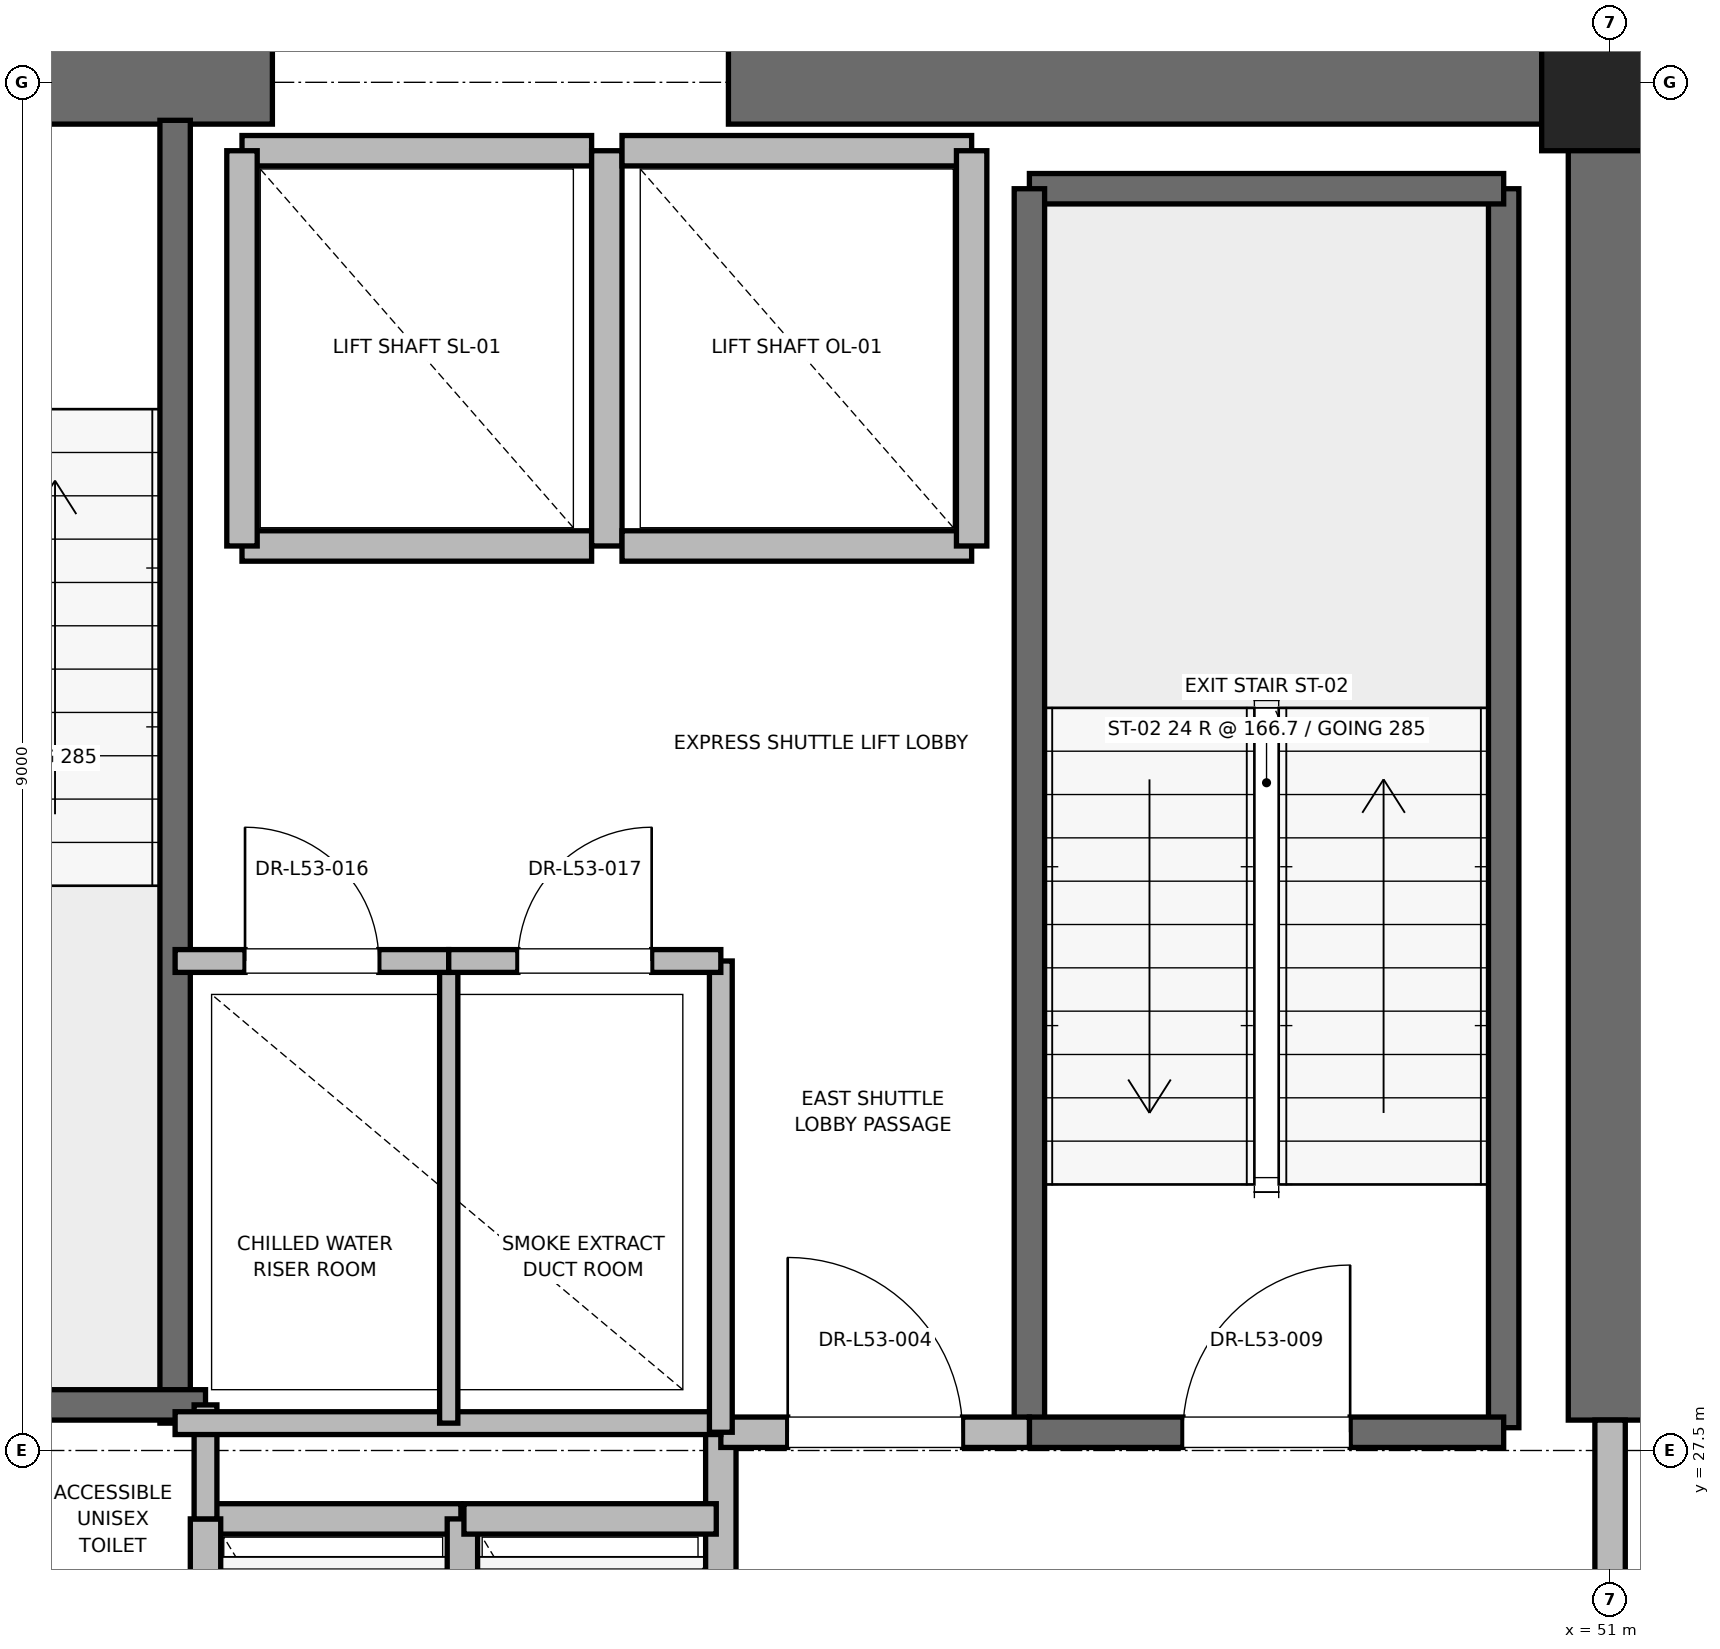
"""IFC4 building model, lengths in metres.
Left out: names, types, materials, properties, quantities, classifications, styles, units other than length and angle.
Written with IfcOpenShell. Run it as: python <this file> out.ifc"""

import sys

from ifc_helpers import new_model, si_unit, direction, frame, frame_2d, origin, origin_2d, place, context, subcontext, project, spatial, rectangle, extrude, element, fill, save


model = new_model("IFC4")
c1 = context("Model", 3, precision=1e-05, world=origin(), true_north=direction((0.0, 1.0)))
c2 = subcontext(c1, "Body", "Model", "MODEL_VIEW")
j1 = project(units=[si_unit("LENGTHUNIT", "METRE"), si_unit("PLANEANGLEUNIT", "RADIAN")], contexts=[c1])
p1 = place(None, origin())
s1 = spatial("IfcSite", under=j1, at=p1, CompositionType="ELEMENT")
p2 = place(p1, origin())
s2 = spatial("IfcBuilding", under=s1, at=p2, CompositionType="ELEMENT")
p3 = place(p2, frame((0.0, 0.0, 229.2)))
s3 = spatial("IfcBuildingStorey", under=s2, at=p3, CompositionType="ELEMENT", Elevation=229.2)
p4 = place(p3, frame((51.0, 36.5, 0.0), z_axis=(0.0, 0.0, 1.0), x_axis=(1.0, 0.0, 0.0)))
e1 = element("IfcColumn", 1, at=p4, inside=s3, PredefinedType="PILASTER", context=c2, shape_type="SweptSolid", body=[
    extrude(rectangle(XDim=0.9, YDim=0.9, at=origin_2d()), origin(), (0.0, 0.0, 1.0), 4.0),
])
p5 = place(p3, frame((37.8, 36.5, 0.0), z_axis=(0.0, 0.0, 1.0), x_axis=(1.0, 0.0, 0.0)))
e2 = element("IfcWall", 2, at=p5, inside=s3, PredefinedType="SHEAR", context=c2, shape_type="SweptSolid", body=[
    extrude(rectangle(XDim=4.4, YDim=0.55, at=frame_2d((2.2, 0.0))), origin(), (0.0, 0.0, 1.0), 3.7),
])
p6 = place(p5, frame((1.65, 0.0, 0.0)))
e3 = element("IfcOpeningElement", 3, at=p6, cuts=e2, PredefinedType="OPENING", context=c2, shape_type="SweptSolid", body=[
    extrude(rectangle(XDim=1.1, YDim=2.15, at=frame_2d((0.55, 1.075))), frame((0.0, 0.275, 0.0), z_axis=(0.0, -1.0, 0.0), x_axis=(1.0, 0.0, 0.0)), (0.0, 0.0, 1.0), 0.55),
])
p7 = place(p3, frame((45.2, 36.5, 0.0), z_axis=(0.0, 0.0, 1.0), x_axis=(1.0, 0.0, 0.0)))
e4 = element("IfcWall", 4, at=p7, inside=s3, PredefinedType="SHEAR", context=c2, shape_type="SweptSolid", body=[
    extrude(rectangle(XDim=5.8, YDim=0.55, at=frame_2d((2.9, 0.0))), origin(), (0.0, 0.0, 1.0), 3.7),
])
p8 = place(p3, frame((51.0, 27.7, 0.0), z_axis=(0.0, 0.0, 1.0), x_axis=(0.0, 1.0, 0.0)))
e5 = element("IfcWall", 5, at=p8, inside=s3, PredefinedType="SHEAR", context=c2, shape_type="SweptSolid", body=[
    extrude(rectangle(XDim=8.8, YDim=0.55, at=frame_2d((4.4, 0.0))), origin(), (0.0, 0.0, 1.0), 3.7),
])
p9 = place(p3, frame((50.3, 27.65, 0.0), z_axis=(0.0, 0.0, 1.0), x_axis=(0.0, 1.0, 0.0)))
e6 = element("IfcWall", 6, at=p9, inside=s3, PredefinedType="SOLIDWALL", context=c2, shape_type="SweptSolid", body=[
    extrude(rectangle(XDim=8.15, YDim=0.2, at=frame_2d((4.075, 0.0))), origin(), (0.0, 0.0, 1.0), 3.7),
])
p10 = place(p3, frame((47.18, 35.8, 0.0), z_axis=(0.0, 0.0, 1.0), x_axis=(1.0, 0.0, 0.0)))
e7 = element("IfcWall", 7, at=p10, inside=s3, PredefinedType="SOLIDWALL", context=c2, shape_type="SweptSolid", body=[
    extrude(rectangle(XDim=3.12, YDim=0.2, at=frame_2d((1.56, 0.0))), origin(), (0.0, 0.0, 1.0), 3.7),
])
p11 = place(p3, frame((47.18, 27.62, 0.0), z_axis=(0.0, 0.0, 1.0), x_axis=(0.0, 1.0, 0.0)))
e8 = element("IfcWall", 8, at=p11, inside=s3, PredefinedType="SOLIDWALL", context=c2, shape_type="SweptSolid", body=[
    extrude(rectangle(XDim=8.18, YDim=0.2, at=frame_2d((4.09, 0.0))), origin(), (0.0, 0.0, 1.0), 3.7),
])
p12 = place(p3, frame((47.18, 27.62, 0.0), z_axis=(0.0, 0.0, 1.0), x_axis=(1.0, 0.0, 0.0)))
e9 = element("IfcWall", 9, at=p12, inside=s3, PredefinedType="SOLIDWALL", context=c2, shape_type="SweptSolid", body=[
    extrude(rectangle(XDim=3.12, YDim=0.2, at=frame_2d((1.56, 0.0))), origin(), (0.0, 0.0, 1.0), 3.7),
])
p13 = place(p12, frame((1.01, 0.0, 0.0)))
e10 = element("IfcOpeningElement", 10, at=p13, cuts=e9, PredefinedType="OPENING", context=c2, shape_type="SweptSolid", body=[
    extrude(rectangle(XDim=1.1, YDim=2.15, at=frame_2d((0.55, 1.075))), frame((0.0, 0.1, 0.0), z_axis=(0.0, -1.0, 0.0), x_axis=(1.0, 0.0, 0.0)), (0.0, 0.0, 1.0), 0.2),
])
p14 = place(p3, frame((41.56, 27.68, 0.0), z_axis=(0.0, 0.0, 1.0), x_axis=(0.0, 1.0, 0.0)))
e11 = element("IfcWall", 11, at=p14, inside=s3, PredefinedType="SOLIDWALL", context=c2, shape_type="SweptSolid", body=[
    extrude(rectangle(XDim=8.57, YDim=0.2, at=frame_2d((4.285, 0.0))), origin(), (0.0, 0.0, 1.0), 3.7),
])
p15 = place(p3, frame((38.44, 27.8, 0.0), z_axis=(0.0, 0.0, 1.0), x_axis=(1.0, 0.0, 0.0)))
e12 = element("IfcWall", 12, at=p15, inside=s3, PredefinedType="SOLIDWALL", context=c2, shape_type="SweptSolid", body=[
    extrude(rectangle(XDim=3.32, YDim=0.2, at=frame_2d((1.66, 0.0))), origin(), (0.0, 0.0, 1.0), 3.7),
])
p16 = place(p3, frame((45.15, 24.25, 0.0), z_axis=(0.0, 0.0, 1.0), x_axis=(0.0, 1.0, 0.0)))
e13 = element("IfcWall", 13, at=p16, inside=s3, PredefinedType="PARTITIONING", context=c2, shape_type="SweptSolid", body=[
    extrude(rectangle(XDim=3.37, YDim=0.2, at=frame_2d((1.685, 0.0))), origin(), (0.0, 0.0, 1.0), 3.7),
])
p17 = place(p3, frame((45.15, 27.62, 0.0), z_axis=(0.0, 0.0, 1.0), x_axis=(1.0, 0.0, 0.0)))
e14 = element("IfcWall", 14, at=p17, inside=s3, PredefinedType="PARTITIONING", context=c2, shape_type="SweptSolid", body=[
    extrude(rectangle(XDim=2.03, YDim=0.2, at=frame_2d((1.015, 0.0))), origin(), (0.0, 0.0, 1.0), 3.7),
])
p18 = place(p17, frame((0.44, 0.0, 0.0)))
e15 = element("IfcOpeningElement", 15, at=p18, cuts=e14, PredefinedType="OPENING", context=c2, shape_type="SweptSolid", body=[
    extrude(rectangle(XDim=1.15, YDim=2.2, at=frame_2d((0.575, 1.1))), frame((0.0, 0.1, 0.0), z_axis=(0.0, -1.0, 0.0), x_axis=(1.0, 0.0, 0.0)), (0.0, 0.0, 1.0), 0.2),
])
p19 = place(p3, frame((51.0, 24.3, 0.0), z_axis=(0.0, 0.0, 1.0), x_axis=(0.0, 1.0, 0.0)))
e16 = element("IfcWall", 16, at=p19, inside=s3, PredefinedType="PARTITIONING", context=c2, shape_type="SweptSolid", body=[
    extrude(rectangle(XDim=3.4, YDim=0.2, at=frame_2d((1.7, 0.0))), origin(), (0.0, 0.0, 1.0), 2.68),
])
p20 = place(p19, frame((1.125, 0.0, 0.0)))
e17 = element("IfcOpeningElement", 17, at=p20, cuts=e16, PredefinedType="OPENING", context=c2, shape_type="SweptSolid", body=[
    extrude(rectangle(XDim=1.15, YDim=2.2, at=frame_2d((0.575, 1.1))), frame((0.0, 0.1, 0.0), z_axis=(0.0, -1.0, 0.0), x_axis=(1.0, 0.0, 0.0)), (0.0, 0.0, 1.0), 0.2),
])
p21 = place(p3, frame((43.44, 27.05, 0.0), z_axis=(0.0, 0.0, 1.0), x_axis=(-1.0, 0.0, 0.0)))
e18 = element("IfcWall", 18, at=p21, inside=s3, PredefinedType="SOLIDWALL", context=c2, shape_type="SweptSolid", body=[
    extrude(rectangle(XDim=1.68, YDim=0.2, at=frame_2d((0.84, 0.0))), origin(), (0.0, 0.0, 1.0), 3.7),
])
for number, where, z_axis, x_axis in (
    (19, (41.76, 27.05, 0.0), (0.0, 0.0, 1.0), (0.0, -1.0, 0.0)),
    (20, (43.45, 24.45, 0.0), (0.0, 0.0, 1.0), (0.0, 1.0, 0.0)),
):
    element("IfcWall", number, at=place(p3, frame(where, z_axis=z_axis, x_axis=x_axis)), inside=s3, PredefinedType="SOLIDWALL", context=c2, shape_type="SweptSolid", body=[
        extrude(rectangle(XDim=2.6, YDim=0.2, at=frame_2d((1.3, 0.0))), origin(), (0.0, 0.0, 1.0), 3.7),
    ])
p22 = place(p3, frame((45.12, 27.05, 0.0), z_axis=(0.0, 0.0, 1.0), x_axis=(-1.0, 0.0, 0.0)))
e21 = element("IfcWall", 21, at=p22, inside=s3, PredefinedType="SOLIDWALL", context=c2, shape_type="SweptSolid", body=[
    extrude(rectangle(XDim=1.66, YDim=0.2, at=frame_2d((0.83, 0.0))), origin(), (0.0, 0.0, 1.0), 3.7),
])
p23 = place(p3, frame((42.0, 33.45, 0.0), z_axis=(0.0, 0.0, 1.0), x_axis=(1.0, 0.0, 0.0)))
e22 = element("IfcWall", 22, at=p23, inside=s3, PredefinedType="SOLIDWALL", context=c2, shape_type="SweptSolid", body=[
    extrude(rectangle(XDim=2.3, YDim=0.2, at=frame_2d((1.15, 0.0))), origin(), (0.0, 0.0, 1.0), 3.7),
])
p24 = place(p3, frame((44.3, 36.05, 0.0), z_axis=(0.0, 0.0, 1.0), x_axis=(-1.0, 0.0, 0.0)))
e23 = element("IfcWall", 23, at=p24, inside=s3, PredefinedType="SOLIDWALL", context=c2, shape_type="SweptSolid", body=[
    extrude(rectangle(XDim=2.3, YDim=0.2, at=frame_2d((1.15, 0.0))), origin(), (0.0, 0.0, 1.0), 2.68),
])
for number, where, z_axis, x_axis in (
    (24, (42.0, 36.05, 0.0), (0.0, 0.0, 1.0), (0.0, -1.0, 0.0)),
    (25, (44.4, 33.45, 0.0), (0.0, 0.0, 1.0), (0.0, 1.0, 0.0)),
):
    element("IfcWall", number, at=place(p3, frame(where, z_axis=z_axis, x_axis=x_axis)), inside=s3, PredefinedType="SOLIDWALL", context=c2, shape_type="SweptSolid", body=[
        extrude(rectangle(XDim=2.6, YDim=0.2, at=frame_2d((1.3, 0.0))), origin(), (0.0, 0.0, 1.0), 2.68),
    ])
p25 = place(p3, frame((44.5, 33.45, 0.0), z_axis=(0.0, 0.0, 1.0), x_axis=(1.0, 0.0, 0.0)))
e26 = element("IfcWall", 26, at=p25, inside=s3, PredefinedType="SOLIDWALL", context=c2, shape_type="SweptSolid", body=[
    extrude(rectangle(XDim=2.3, YDim=0.2, at=frame_2d((1.15, 0.0))), origin(), (0.0, 0.0, 1.0), 3.7),
])
p26 = place(p3, frame((46.8, 36.05, 0.0), z_axis=(0.0, 0.0, 1.0), x_axis=(-1.0, 0.0, 0.0)))
e27 = element("IfcWall", 27, at=p26, inside=s3, PredefinedType="SOLIDWALL", context=c2, shape_type="SweptSolid", body=[
    extrude(rectangle(XDim=2.3, YDim=0.2, at=frame_2d((1.15, 0.0))), origin(), (0.0, 0.0, 1.0), 2.68),
])
p27 = place(p3, frame((46.8, 33.45, 0.0), z_axis=(0.0, 0.0, 1.0), x_axis=(0.0, 1.0, 0.0)))
e28 = element("IfcWall", 28, at=p27, inside=s3, PredefinedType="SOLIDWALL", context=c2, shape_type="SweptSolid", body=[
    extrude(rectangle(XDim=2.6, YDim=0.2, at=frame_2d((1.3, 0.0))), origin(), (0.0, 0.0, 1.0), 3.7),
])
p28 = place(p3, frame((41.76, 27.05, 0.0), z_axis=(0.0, 0.0, 1.0), x_axis=(0.0, 1.0, 0.0)))
e29 = element("IfcWall", 29, at=p28, inside=s3, PredefinedType="PARTITIONING", context=c2, shape_type="SweptSolid", body=[
    extrude(rectangle(XDim=0.75, YDim=0.15, at=frame_2d((0.375, 0.0))), origin(), (0.0, 0.0, 1.0), 2.85),
])
p29 = place(p3, frame((41.56, 27.68, 0.0), z_axis=(0.0, 0.0, 1.0), x_axis=(1.0, 0.0, 0.0)))
e30 = element("IfcWall", 30, at=p29, inside=s3, PredefinedType="PARTITIONING", context=c2, shape_type="SweptSolid", body=[
    extrude(rectangle(XDim=3.59, YDim=0.15, at=frame_2d((1.795, 0.0))), origin(), (0.0, 0.0, 1.0), 2.85),
])
p30 = place(p3, frame((45.15, 27.62, 0.0), z_axis=(0.0, 0.0, 1.0), x_axis=(0.0, 1.0, 0.0)))
e31 = element("IfcWall", 31, at=p30, inside=s3, PredefinedType="PARTITIONING", context=c2, shape_type="SweptSolid", body=[
    extrude(rectangle(XDim=3.1, YDim=0.15, at=frame_2d((1.55, 0.0))), origin(), (0.0, 0.0, 1.0), 2.85),
])
p31 = place(p3, frame((43.36, 27.68, 0.0), z_axis=(0.0, 0.0, 1.0), x_axis=(0.0, 1.0, 0.0)))
e32 = element("IfcWall", 32, at=p31, inside=s3, PredefinedType="PARTITIONING", context=c2, shape_type="SweptSolid", body=[
    extrude(rectangle(XDim=3.04, YDim=0.12, at=frame_2d((1.52, 0.0))), origin(), (0.0, 0.0, 1.0), 2.85),
])
p32 = place(p3, frame((41.56, 30.72, 0.0), z_axis=(0.0, 0.0, 1.0), x_axis=(1.0, 0.0, 0.0)))
e33 = element("IfcWall", 33, at=p32, inside=s3, PredefinedType="PARTITIONING", context=c2, shape_type="SweptSolid", body=[
    extrude(rectangle(XDim=1.8, YDim=0.15, at=frame_2d((0.9, 0.0))), origin(), (0.0, 0.0, 1.0), 2.85),
])
p33 = place(p32, frame((0.46, 0.0, 0.0)))
e34 = element("IfcOpeningElement", 34, at=p33, cuts=e33, PredefinedType="OPENING", context=c2, shape_type="SweptSolid", body=[
    extrude(rectangle(XDim=0.88, YDim=2.1, at=frame_2d((0.44, 1.05))), frame((0.0, 0.075, 0.0), z_axis=(0.0, -1.0, 0.0), x_axis=(1.0, 0.0, 0.0)), (0.0, 0.0, 1.0), 0.15),
])
p34 = place(p3, frame((43.36, 30.72, 0.0), z_axis=(0.0, 0.0, 1.0), x_axis=(1.0, 0.0, 0.0)))
e35 = element("IfcWall", 35, at=p34, inside=s3, PredefinedType="PARTITIONING", context=c2, shape_type="SweptSolid", body=[
    extrude(rectangle(XDim=1.79, YDim=0.15, at=frame_2d((0.895, 0.0))), origin(), (0.0, 0.0, 1.0), 2.85),
])
p35 = place(p34, frame((0.455, 0.0, 0.0)))
e36 = element("IfcOpeningElement", 36, at=p35, cuts=e35, PredefinedType="OPENING", context=c2, shape_type="SweptSolid", body=[
    extrude(rectangle(XDim=0.88, YDim=2.1, at=frame_2d((0.44, 1.05))), frame((0.0, 0.075, 0.0), z_axis=(0.0, -1.0, 0.0), x_axis=(1.0, 0.0, 0.0)), (0.0, 0.0, 1.0), 0.15),
])
p36 = place(p13, origin())
e37 = element("IfcDoor", 37, at=p36, inside=s3, OperationType="SINGLE_SWING_RIGHT", PredefinedType="DOOR", context=c2, shape_type="SweptSolid", body=[
    extrude(rectangle(XDim=1.1, YDim=2.15, at=frame_2d((0.55, 1.075))), frame((0.0, 0.025, 0.0), z_axis=(0.0, -1.0, 0.0), x_axis=(1.0, 0.0, 0.0)), (0.0, 0.0, 1.0), 0.05),
])
fill(e10, e37)
p37 = place(p18, origin())
e38 = element("IfcDoor", 38, at=p37, inside=s3, OperationType="SINGLE_SWING_LEFT", PredefinedType="DOOR", context=c2, shape_type="SweptSolid", body=[
    extrude(rectangle(XDim=1.15, YDim=2.2, at=frame_2d((0.575, 1.1))), frame((0.0, 0.025, 0.0), z_axis=(0.0, -1.0, 0.0), x_axis=(1.0, 0.0, 0.0)), (0.0, 0.0, 1.0), 0.05),
])
fill(e15, e38)
p38 = place(p33, origin())
e39 = element("IfcDoor", 39, at=p38, inside=s3, OperationType="SINGLE_SWING_LEFT", PredefinedType="DOOR", context=c2, shape_type="SweptSolid", body=[
    extrude(rectangle(XDim=0.88, YDim=2.1, at=frame_2d((0.44, 1.05))), frame((0.0, 0.025, 0.0), z_axis=(0.0, -1.0, 0.0), x_axis=(1.0, 0.0, 0.0)), (0.0, 0.0, 1.0), 0.05),
])
fill(e34, e39)
p39 = place(p35, origin())
e40 = element("IfcDoor", 40, at=p39, inside=s3, OperationType="SINGLE_SWING_RIGHT", PredefinedType="DOOR", context=c2, shape_type="SweptSolid", body=[
    extrude(rectangle(XDim=0.88, YDim=2.1, at=frame_2d((0.44, 1.05))), frame((0.0, 0.025, 0.0), z_axis=(0.0, -1.0, 0.0), x_axis=(1.0, 0.0, 0.0)), (0.0, 0.0, 1.0), 0.05),
])
fill(e36, e40)
save(model, sys.argv[1])
